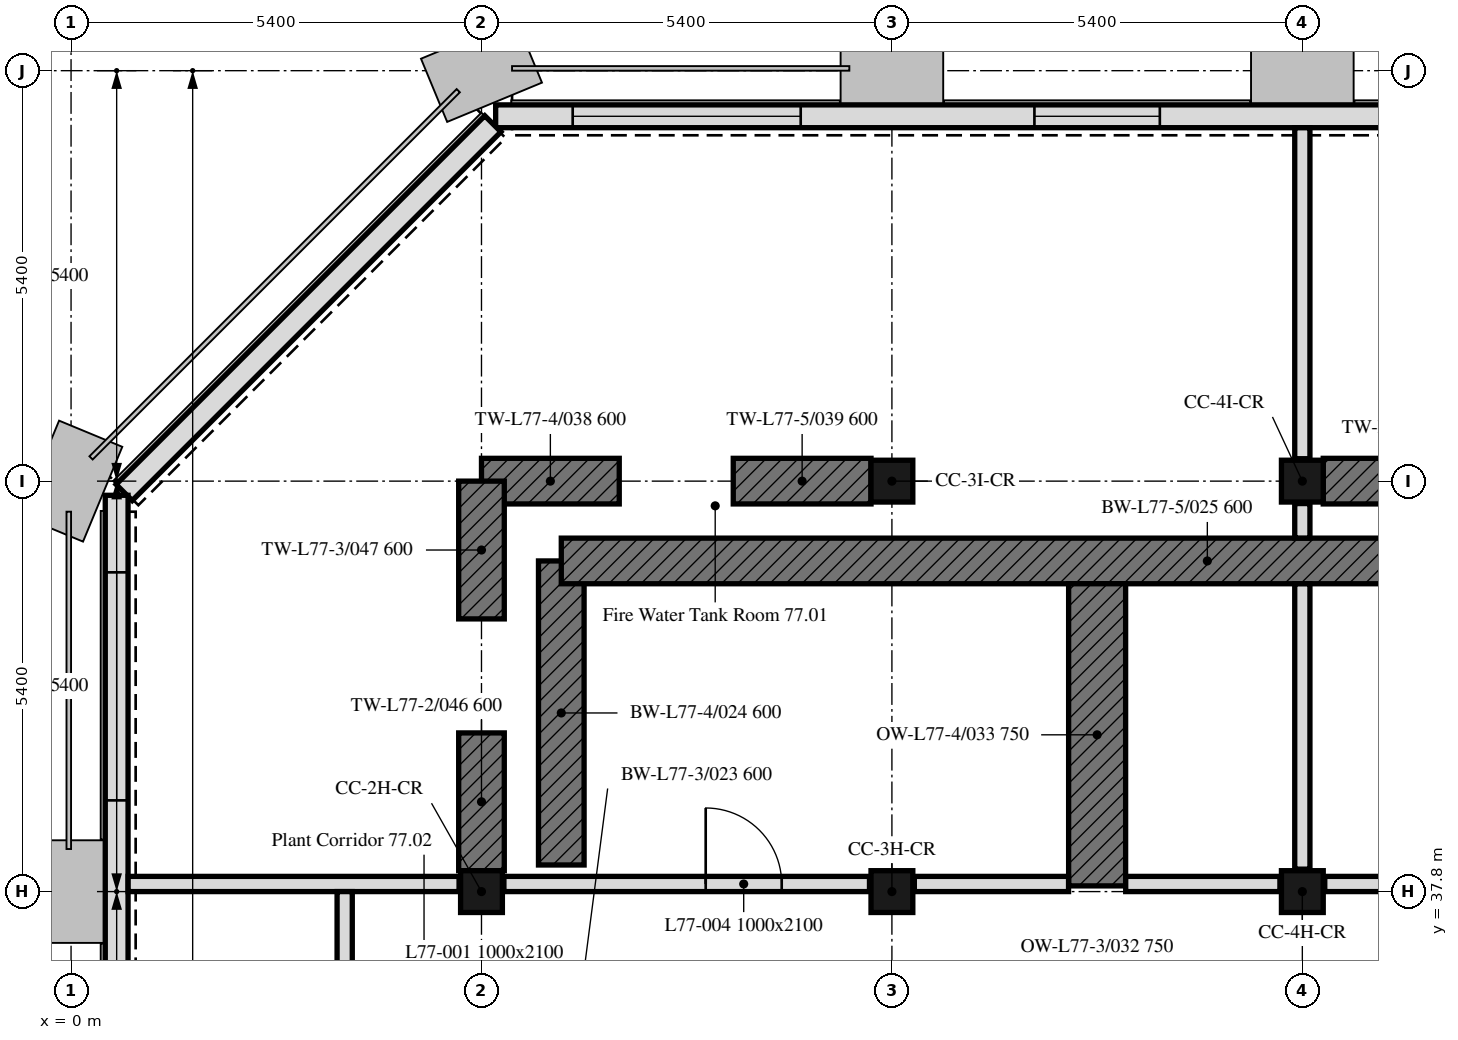
"""IFC4 building model, lengths in metres.
Left out: names, types, materials, properties, quantities, classifications, styles, units other than length and angle.
Written with IfcOpenShell. Run it as: python <this file> out.ifc"""

import sys

from ifc_helpers import new_model, si_unit, direction, frame, frame_2d, origin, origin_2d, place, context, subcontext, project, spatial, polyline, rectangle, outline, extrude, element, fill, save


model = new_model("IFC4")
c1 = context("Model", 3, precision=1e-05, world=origin(), true_north=direction((0.0, 1.0)))
c2 = subcontext(c1, "Body", "Model", "MODEL_VIEW")
j1 = project(units=[si_unit("LENGTHUNIT", "METRE"), si_unit("PLANEANGLEUNIT", "RADIAN")], contexts=[c1])
p1 = place(None, origin())
s1 = spatial("IfcSite", under=j1, at=p1, CompositionType="ELEMENT")
p2 = place(p1, origin())
s2 = spatial("IfcBuilding", under=s1, at=p2, CompositionType="ELEMENT")
p3 = place(p2, frame((0.0, 0.0, 308.2)))
s3 = spatial("IfcBuildingStorey", under=s2, at=p3, CompositionType="ELEMENT", Elevation=308.2)
for number, where, z_axis, x_axis in (
    (1, (5.4, 37.8, 0.0), (0.0, 0.0, 1.0), (1.0, 0.0, 0.0)),
    (2, (10.8, 37.8, 0.0), (0.0, 0.0, 1.0), (1.0, 0.0, 0.0)),
    (3, (16.2, 37.8, 0.0), (0.0, 0.0, 1.0), (1.0, 0.0, 0.0)),
    (4, (10.8, 43.2, 0.0), (0.0, 0.0, 1.0), (1.0, 0.0, 0.0)),
    (5, (16.2, 43.2, 0.0), (0.0, 0.0, 1.0), (1.0, 0.0, 0.0)),
):
    element("IfcColumn", number, at=place(p3, frame(where, z_axis=z_axis, x_axis=x_axis)), inside=s3, PredefinedType="COLUMN", context=c2, shape_type="SweptSolid", body=[
        extrude(rectangle(XDim=0.55, YDim=0.55, at=origin_2d()), origin(), (0.0, 0.0, 1.0), 4.2),
    ])
p4 = place(p3, frame((6.45, 38.15, 0.0), z_axis=(0.0, 0.0, 1.0), x_axis=(0.0, 1.0, 0.0)))
e6 = element("IfcWall", 6, at=p4, inside=s3, PredefinedType="SHEAR", context=c2, shape_type="SweptSolid", body=[
    extrude(rectangle(XDim=4.0, YDim=0.6, at=frame_2d((2.0, 0.0))), origin(), (0.0, 0.0, 1.0), 4.2),
])
p5 = place(p3, frame((6.45, 42.15, 0.0), z_axis=(0.0, 0.0, 1.0), x_axis=(1.0, 0.0, 0.0)))
e7 = element("IfcWall", 7, at=p5, inside=s3, PredefinedType="SHEAR", context=c2, shape_type="SweptSolid", body=[
    extrude(rectangle(XDim=17.0, YDim=0.6, at=frame_2d((8.5, 0.0))), origin(), (0.0, 0.0, 1.0), 4.2),
])
p6 = place(p3, frame((13.5, 37.875, 0.0), z_axis=(0.0, 0.0, 1.0), x_axis=(0.0, 1.0, 0.0)))
e8 = element("IfcWall", 8, at=p6, inside=s3, PredefinedType="SHEAR", context=c2, shape_type="SweptSolid", body=[
    extrude(rectangle(XDim=3.975, YDim=0.75, at=frame_2d((1.988, 0.0))), origin(), (0.0, 0.0, 1.0), 4.2),
])
for number, where, z_axis, x_axis in (
    (9, (5.4, 38.075, 0.0), (0.0, 0.0, 1.0), (0.0, 1.0, 0.0)),
    (10, (5.4, 41.387, 0.0), (0.0, 0.0, 1.0), (0.0, 1.0, 0.0)),
    (11, (5.4, 43.2, 0.0), (0.0, 0.0, 1.0), (1.0, 0.0, 0.0)),
    (12, (8.712, 43.2, 0.0), (0.0, 0.0, 1.0), (1.0, 0.0, 0.0)),
):
    element("IfcWall", number, at=place(p3, frame(where, z_axis=z_axis, x_axis=x_axis)), inside=s3, PredefinedType="SHEAR", context=c2, shape_type="SweptSolid", body=[
        extrude(rectangle(XDim=1.812, YDim=0.6, at=frame_2d((0.906, 0.0))), origin(), (0.0, 0.0, 1.0), 4.2),
    ])
p7 = place(p3, frame((16.475, 43.2, 0.0), z_axis=(0.0, 0.0, 1.0), x_axis=(1.0, 0.0, 0.0)))
e13 = element("IfcWall", 13, at=p7, inside=s3, PredefinedType="SHEAR", context=c2, shape_type="SweptSolid", body=[
    extrude(rectangle(XDim=1.675, YDim=0.6, at=frame_2d((0.837, 0.0))), origin(), (0.0, 0.0, 1.0), 4.2),
])
p8 = place(p3, frame((37.614, 48.0, 0.0), z_axis=(0.0, 0.0, 1.0), x_axis=(-1.0, 0.0, 0.0)))
e14 = element("IfcWall", 14, at=p8, inside=s3, PredefinedType="SOLIDWALL", context=c2, shape_type="SweptSolid", body=[
    extrude(outline(polyline([(0.0, 0.0), (32.027, 0.0), (32.027, 4.2), (31.434, 4.2), (30.841, 4.2), (30.248, 4.2), (29.655, 4.2), (29.062, 4.2), (28.469, 4.2), (27.875, 4.2), (27.282, 4.2), (26.689, 4.2), (26.096, 4.2), (25.503, 4.2), (24.91, 4.2), (24.317, 4.2), (23.724, 4.2), (23.131, 4.2), (22.538, 4.2), (21.945, 4.2), (21.352, 4.2), (20.758, 4.2), (20.165, 4.2), (19.572, 4.2), (18.979, 4.2), (18.386, 4.2), (17.793, 4.2), (17.2, 4.2), (16.607, 4.2), (16.014, 4.2), (15.42, 4.2), (14.827, 4.2), (14.234, 4.2), (13.641, 4.2), (13.048, 4.2), (12.455, 4.2), (11.862, 4.2), (11.269, 4.2), (10.676, 4.2), (10.083, 4.2), (9.49, 4.2), (8.896, 4.2), (8.303, 4.2), (7.71, 4.2), (7.117, 4.2), (6.524, 4.2), (5.931, 4.2), (5.338, 4.2), (4.745, 4.2), (4.152, 4.2), (3.559, 4.2), (2.966, 4.2), (2.372, 4.2), (1.779, 4.2), (1.186, 4.2), (0.593, 4.2), (0.0, 4.2), (0.0, 0.0)])), frame((0.0, 0.15, 0.0), z_axis=(0.0, -1.0, 0.0), x_axis=(1.0, 0.0, 0.0)), (0.0, 0.0, 1.0), 0.3),
])
p9 = place(p8, frame((1.014, 0.0, 0.6)))
e15 = element("IfcOpeningElement", 15, at=p9, cuts=e14, PredefinedType="OPENING", context=c2, shape_type="SweptSolid", body=[
    extrude(rectangle(XDim=3.0, YDim=1.8, at=frame_2d((1.5, 0.9))), frame((0.0, 0.16, 0.0), z_axis=(0.0, -1.0, 0.0), x_axis=(1.0, 0.0, 0.0)), (0.0, 0.0, 1.0), 0.32),
])
p10 = place(p8, frame((7.089, 0.0, 0.6)))
e16 = element("IfcOpeningElement", 16, at=p10, cuts=e14, PredefinedType="OPENING", context=c2, shape_type="SweptSolid", body=[
    extrude(rectangle(XDim=1.65, YDim=1.8, at=frame_2d((0.825, 0.9))), frame((0.0, 0.16, 0.0), z_axis=(0.0, -1.0, 0.0), x_axis=(1.0, 0.0, 0.0)), (0.0, 0.0, 1.0), 0.32),
])
p11 = place(p8, frame((12.489, 0.0, 0.6)))
e17 = element("IfcOpeningElement", 17, at=p11, cuts=e14, PredefinedType="OPENING", context=c2, shape_type="SweptSolid", body=[
    extrude(rectangle(XDim=1.65, YDim=1.8, at=frame_2d((0.825, 0.9))), frame((0.0, 0.16, 0.0), z_axis=(0.0, -1.0, 0.0), x_axis=(1.0, 0.0, 0.0)), (0.0, 0.0, 1.0), 0.32),
])
p12 = place(p8, frame((17.889, 0.0, 0.6)))
e18 = element("IfcOpeningElement", 18, at=p12, cuts=e14, PredefinedType="OPENING", context=c2, shape_type="SweptSolid", body=[
    extrude(rectangle(XDim=1.65, YDim=1.8, at=frame_2d((0.825, 0.9))), frame((0.0, 0.16, 0.0), z_axis=(0.0, -1.0, 0.0), x_axis=(1.0, 0.0, 0.0)), (0.0, 0.0, 1.0), 0.32),
])
p13 = place(p8, frame((23.289, 0.0, 0.6)))
e19 = element("IfcOpeningElement", 19, at=p13, cuts=e14, PredefinedType="OPENING", context=c2, shape_type="SweptSolid", body=[
    extrude(rectangle(XDim=1.65, YDim=1.8, at=frame_2d((0.825, 0.9))), frame((0.0, 0.16, 0.0), z_axis=(0.0, -1.0, 0.0), x_axis=(1.0, 0.0, 0.0)), (0.0, 0.0, 1.0), 0.32),
])
p14 = place(p8, frame((28.014, 0.0, 0.6)))
e20 = element("IfcOpeningElement", 20, at=p14, cuts=e14, PredefinedType="OPENING", context=c2, shape_type="SweptSolid", body=[
    extrude(rectangle(XDim=3.0, YDim=1.8, at=frame_2d((1.5, 0.9))), frame((0.0, 0.16, 0.0), z_axis=(0.0, -1.0, 0.0), x_axis=(1.0, 0.0, 0.0)), (0.0, 0.0, 1.0), 0.32),
])
p15 = place(p3, frame((5.55, 47.901, 0.0), z_axis=(0.0, 0.0, 1.0), x_axis=(-0.707106781187, -0.707106781187, 0.0)))
e21 = element("IfcWall", 21, at=p15, inside=s3, PredefinedType="SOLIDWALL", context=c2, shape_type="SweptSolid", body=[
    extrude(outline(polyline([(0.0, 0.0), (6.86, 0.0), (6.86, 4.2), (6.288, 4.2), (5.716, 4.2), (5.145, 4.2), (4.573, 4.2), (4.001, 4.2), (3.43, 4.2), (2.858, 4.2), (2.287, 4.2), (1.715, 4.2), (1.143, 4.2), (0.572, 4.2), (0.0, 4.2), (0.0, 0.0)])), frame((0.0, 0.15, 0.0), z_axis=(0.0, -1.0, 0.0), x_axis=(1.0, 0.0, 0.0)), (0.0, 0.0, 1.0), 0.3),
])
p16 = place(p3, frame((0.6, 43.014, 0.0), z_axis=(0.0, 0.0, 1.0), x_axis=(0.0, -1.0, 0.0)))
e22 = element("IfcWall", 22, at=p16, inside=s3, PredefinedType="SOLIDWALL", context=c2, shape_type="SweptSolid", body=[
    extrude(outline(polyline([(0.0, 0.0), (32.027, 0.0), (32.027, 4.2), (31.434, 4.2), (30.841, 4.2), (30.248, 4.2), (29.655, 4.2), (29.062, 4.2), (28.469, 4.2), (27.875, 4.2), (27.282, 4.2), (26.689, 4.2), (26.096, 4.2), (25.503, 4.2), (24.91, 4.2), (24.317, 4.2), (23.724, 4.2), (23.131, 4.2), (22.538, 4.2), (21.945, 4.2), (21.352, 4.2), (20.758, 4.2), (20.165, 4.2), (19.572, 4.2), (18.979, 4.2), (18.386, 4.2), (17.793, 4.2), (17.2, 4.2), (16.607, 4.2), (16.014, 4.2), (15.42, 4.2), (14.827, 4.2), (14.234, 4.2), (13.641, 4.2), (13.048, 4.2), (12.455, 4.2), (11.862, 4.2), (11.269, 4.2), (10.676, 4.2), (10.083, 4.2), (9.49, 4.2), (8.896, 4.2), (8.303, 4.2), (7.71, 4.2), (7.117, 4.2), (6.524, 4.2), (5.931, 4.2), (5.338, 4.2), (4.745, 4.2), (4.152, 4.2), (3.559, 4.2), (2.966, 4.2), (2.372, 4.2), (1.779, 4.2), (1.186, 4.2), (0.593, 4.2), (0.0, 4.2), (0.0, 0.0)])), frame((0.0, 0.15, 0.0), z_axis=(0.0, -1.0, 0.0), x_axis=(1.0, 0.0, 0.0)), (0.0, 0.0, 1.0), 0.3),
])
p17 = place(p16, frame((1.014, 0.0, 0.6)))
e23 = element("IfcOpeningElement", 23, at=p17, cuts=e22, PredefinedType="OPENING", context=c2, shape_type="SweptSolid", body=[
    extrude(rectangle(XDim=3.0, YDim=1.8, at=frame_2d((1.5, 0.9))), frame((0.0, 0.16, 0.0), z_axis=(0.0, -1.0, 0.0), x_axis=(1.0, 0.0, 0.0)), (0.0, 0.0, 1.0), 0.32),
])
p18 = place(p16, frame((7.089, 0.0, 0.6)))
e24 = element("IfcOpeningElement", 24, at=p18, cuts=e22, PredefinedType="OPENING", context=c2, shape_type="SweptSolid", body=[
    extrude(rectangle(XDim=1.65, YDim=1.8, at=frame_2d((0.825, 0.9))), frame((0.0, 0.16, 0.0), z_axis=(0.0, -1.0, 0.0), x_axis=(1.0, 0.0, 0.0)), (0.0, 0.0, 1.0), 0.32),
])
p19 = place(p16, frame((12.489, 0.0, 0.6)))
e25 = element("IfcOpeningElement", 25, at=p19, cuts=e22, PredefinedType="OPENING", context=c2, shape_type="SweptSolid", body=[
    extrude(rectangle(XDim=1.65, YDim=1.8, at=frame_2d((0.825, 0.9))), frame((0.0, 0.16, 0.0), z_axis=(0.0, -1.0, 0.0), x_axis=(1.0, 0.0, 0.0)), (0.0, 0.0, 1.0), 0.32),
])
p20 = place(p16, frame((17.889, 0.0, 0.6)))
e26 = element("IfcOpeningElement", 26, at=p20, cuts=e22, PredefinedType="OPENING", context=c2, shape_type="SweptSolid", body=[
    extrude(rectangle(XDim=1.65, YDim=1.8, at=frame_2d((0.825, 0.9))), frame((0.0, 0.16, 0.0), z_axis=(0.0, -1.0, 0.0), x_axis=(1.0, 0.0, 0.0)), (0.0, 0.0, 1.0), 0.32),
])
p21 = place(p16, frame((23.289, 0.0, 0.6)))
e27 = element("IfcOpeningElement", 27, at=p21, cuts=e22, PredefinedType="OPENING", context=c2, shape_type="SweptSolid", body=[
    extrude(rectangle(XDim=1.65, YDim=1.8, at=frame_2d((0.825, 0.9))), frame((0.0, 0.16, 0.0), z_axis=(0.0, -1.0, 0.0), x_axis=(1.0, 0.0, 0.0)), (0.0, 0.0, 1.0), 0.32),
])
p22 = place(p16, frame((28.014, 0.0, 0.6)))
e28 = element("IfcOpeningElement", 28, at=p22, cuts=e22, PredefinedType="OPENING", context=c2, shape_type="SweptSolid", body=[
    extrude(rectangle(XDim=3.0, YDim=1.8, at=frame_2d((1.5, 0.9))), frame((0.0, 0.16, 0.0), z_axis=(0.0, -1.0, 0.0), x_axis=(1.0, 0.0, 0.0)), (0.0, 0.0, 1.0), 0.32),
])
p23 = place(p3, frame((16.2, 47.849, 0.0), z_axis=(0.0, 0.0, 1.0), x_axis=(0.0, -1.0, 0.0)))
e29 = element("IfcWall", 29, at=p23, inside=s3, PredefinedType="PARTITIONING", context=c2, shape_type="SweptSolid", body=[
    extrude(rectangle(XDim=4.354, YDim=0.2, at=frame_2d((2.177, 0.0))), origin(), (0.0, 0.0, 1.0), 3.45),
])
p24 = place(p3, frame((16.2, 42.905, 0.0), z_axis=(0.0, 0.0, 1.0), x_axis=(0.0, -1.0, 0.0)))
e30 = element("IfcWall", 30, at=p24, inside=s3, PredefinedType="PARTITIONING", context=c2, shape_type="SweptSolid", body=[
    extrude(rectangle(XDim=0.454, YDim=0.2, at=frame_2d((0.227, 0.0))), origin(), (0.0, 0.0, 1.0), 3.45),
])
p25 = place(p3, frame((16.2, 41.849, 0.0), z_axis=(0.0, 0.0, 1.0), x_axis=(0.0, -1.0, 0.0)))
e31 = element("IfcWall", 31, at=p25, inside=s3, PredefinedType="PARTITIONING", context=c2, shape_type="SweptSolid", body=[
    extrude(rectangle(XDim=3.754, YDim=0.2, at=frame_2d((1.877, 0.0))), origin(), (0.0, 0.0, 1.0), 3.45),
])
p26 = place(p3, frame((16.495, 37.9, 0.0), z_axis=(0.0, 0.0, 1.0), x_axis=(1.0, 0.0, 0.0)))
e32 = element("IfcWall", 32, at=p26, inside=s3, PredefinedType="PARTITIONING", context=c2, shape_type="SweptSolid", body=[
    extrude(rectangle(XDim=4.81, YDim=0.2, at=frame_2d((2.405, 0.0))), origin(), (0.0, 0.0, 1.0), 4.2),
])
p27 = place(p26, frame((1.922, 0.0, 0.0)))
e33 = element("IfcOpeningElement", 33, at=p27, cuts=e32, PredefinedType="OPENING", context=c2, shape_type="SweptSolid", body=[
    extrude(rectangle(XDim=1.0, YDim=2.1, at=frame_2d((0.5, 1.05))), frame((0.0, 0.1, 0.0), z_axis=(0.0, -1.0, 0.0), x_axis=(1.0, 0.0, 0.0)), (0.0, 0.0, 1.0), 0.2),
])
p28 = place(p3, frame((5.105, 37.9, 0.0), z_axis=(0.0, 0.0, 1.0), x_axis=(-1.0, 0.0, 0.0)))
e34 = element("IfcWall", 34, at=p28, inside=s3, PredefinedType="PARTITIONING", context=c2, shape_type="SweptSolid", body=[
    extrude(rectangle(XDim=4.354, YDim=0.2, at=frame_2d((2.177, 0.0))), origin(), (0.0, 0.0, 1.0), 3.45),
])
p29 = place(p3, frame((5.695, 37.9, 0.0), z_axis=(0.0, 0.0, 1.0), x_axis=(1.0, 0.0, 0.0)))
e35 = element("IfcWall", 35, at=p29, inside=s3, PredefinedType="PARTITIONING", context=c2, shape_type="SweptSolid", body=[
    extrude(rectangle(XDim=4.81, YDim=0.2, at=frame_2d((2.405, 0.0))), origin(), (0.0, 0.0, 1.0), 3.45),
])
p30 = place(p29, frame((2.655, 0.0, 0.0)))
e36 = element("IfcOpeningElement", 36, at=p30, cuts=e35, PredefinedType="OPENING", context=c2, shape_type="SweptSolid", body=[
    extrude(rectangle(XDim=1.0, YDim=2.1, at=frame_2d((0.5, 1.05))), frame((0.0, 0.1, 0.0), z_axis=(0.0, -1.0, 0.0), x_axis=(1.0, 0.0, 0.0)), (0.0, 0.0, 1.0), 0.2),
])
for number, where, z_axis, x_axis in (
    (37, (11.095, 37.9, 0.0), (0.0, 0.0, 1.0), (1.0, 0.0, 0.0)),
    (38, (13.876, 37.9, 0.0), (0.0, 0.0, 1.0), (1.0, 0.0, 0.0)),
):
    element("IfcWall", number, at=place(p3, frame(where, z_axis=z_axis, x_axis=x_axis)), inside=s3, PredefinedType="PARTITIONING", context=c2, shape_type="SweptSolid", body=[
        extrude(rectangle(XDim=2.029, YDim=0.2, at=frame_2d((1.015, 0.0))), origin(), (0.0, 0.0, 1.0), 3.45),
    ])
p31 = place(p3, frame((3.6, 27.1, 0.0), z_axis=(0.0, 0.0, 1.0), x_axis=(0.0, 1.0, 0.0)))
e39 = element("IfcWall", 39, at=p31, inside=s3, PredefinedType="PARTITIONING", context=c2, shape_type="SweptSolid", body=[
    extrude(rectangle(XDim=10.7, YDim=0.2, at=frame_2d((5.35, 0.0))), origin(), (0.0, 0.0, 1.0), 3.45),
])
p32 = place(p31, frame((7.55, 0.0, 0.0)))
e40 = element("IfcOpeningElement", 40, at=p32, cuts=e39, PredefinedType="OPENING", context=c2, shape_type="SweptSolid", body=[
    extrude(rectangle(XDim=1.0, YDim=2.1, at=frame_2d((0.5, 1.05))), frame((0.0, 0.1, 0.0), z_axis=(0.0, -1.0, 0.0), x_axis=(1.0, 0.0, 0.0)), (0.0, 0.0, 1.0), 0.2),
])
p33 = place(p31, frame((2.1, 0.0, 0.0)))
e41 = element("IfcOpeningElement", 41, at=p33, cuts=e39, PredefinedType="OPENING", context=c2, shape_type="SweptSolid", body=[
    extrude(rectangle(XDim=1.0, YDim=2.1, at=frame_2d((0.5, 1.05))), frame((0.0, 0.1, 0.0), z_axis=(0.0, -1.0, 0.0), x_axis=(1.0, 0.0, 0.0)), (0.0, 0.0, 1.0), 0.2),
])
p34 = place(p13, origin())
e42 = element("IfcWindow", 42, at=p34, inside=s3, PartitioningType="SINGLE_PANEL", PredefinedType="WINDOW", context=c2, shape_type="SweptSolid", body=[
    extrude(rectangle(XDim=1.65, YDim=1.8, at=frame_2d((0.825, 0.9))), frame((0.0, 0.03, 0.0), z_axis=(0.0, -1.0, 0.0), x_axis=(1.0, 0.0, 0.0)), (0.0, 0.0, 1.0), 0.06),
])
fill(e19, e42)
p35 = place(p14, origin())
e43 = element("IfcWindow", 43, at=p35, inside=s3, PartitioningType="SINGLE_PANEL", PredefinedType="WINDOW", context=c2, shape_type="SweptSolid", body=[
    extrude(rectangle(XDim=3.0, YDim=1.8, at=frame_2d((1.5, 0.9))), frame((0.0, 0.03, 0.0), z_axis=(0.0, -1.0, 0.0), x_axis=(1.0, 0.0, 0.0)), (0.0, 0.0, 1.0), 0.06),
])
fill(e20, e43)
p36 = place(p17, origin())
e44 = element("IfcWindow", 44, at=p36, inside=s3, PartitioningType="SINGLE_PANEL", PredefinedType="WINDOW", context=c2, shape_type="SweptSolid", body=[
    extrude(rectangle(XDim=3.0, YDim=1.8, at=frame_2d((1.5, 0.9))), frame((0.0, 0.03, 0.0), z_axis=(0.0, -1.0, 0.0), x_axis=(1.0, 0.0, 0.0)), (0.0, 0.0, 1.0), 0.06),
])
fill(e23, e44)
p37 = place(p30, origin())
e45 = element("IfcDoor", 45, at=p37, inside=s3, OperationType="SINGLE_SWING_LEFT", PredefinedType="DOOR", context=c2, shape_type="SweptSolid", body=[
    extrude(rectangle(XDim=1.0, YDim=2.1, at=frame_2d((0.5, 1.05))), frame((0.0, 0.025, 0.0), z_axis=(0.0, -1.0, 0.0), x_axis=(1.0, 0.0, 0.0)), (0.0, 0.0, 1.0), 0.05),
])
fill(e36, e45)
save(model, sys.argv[1])
